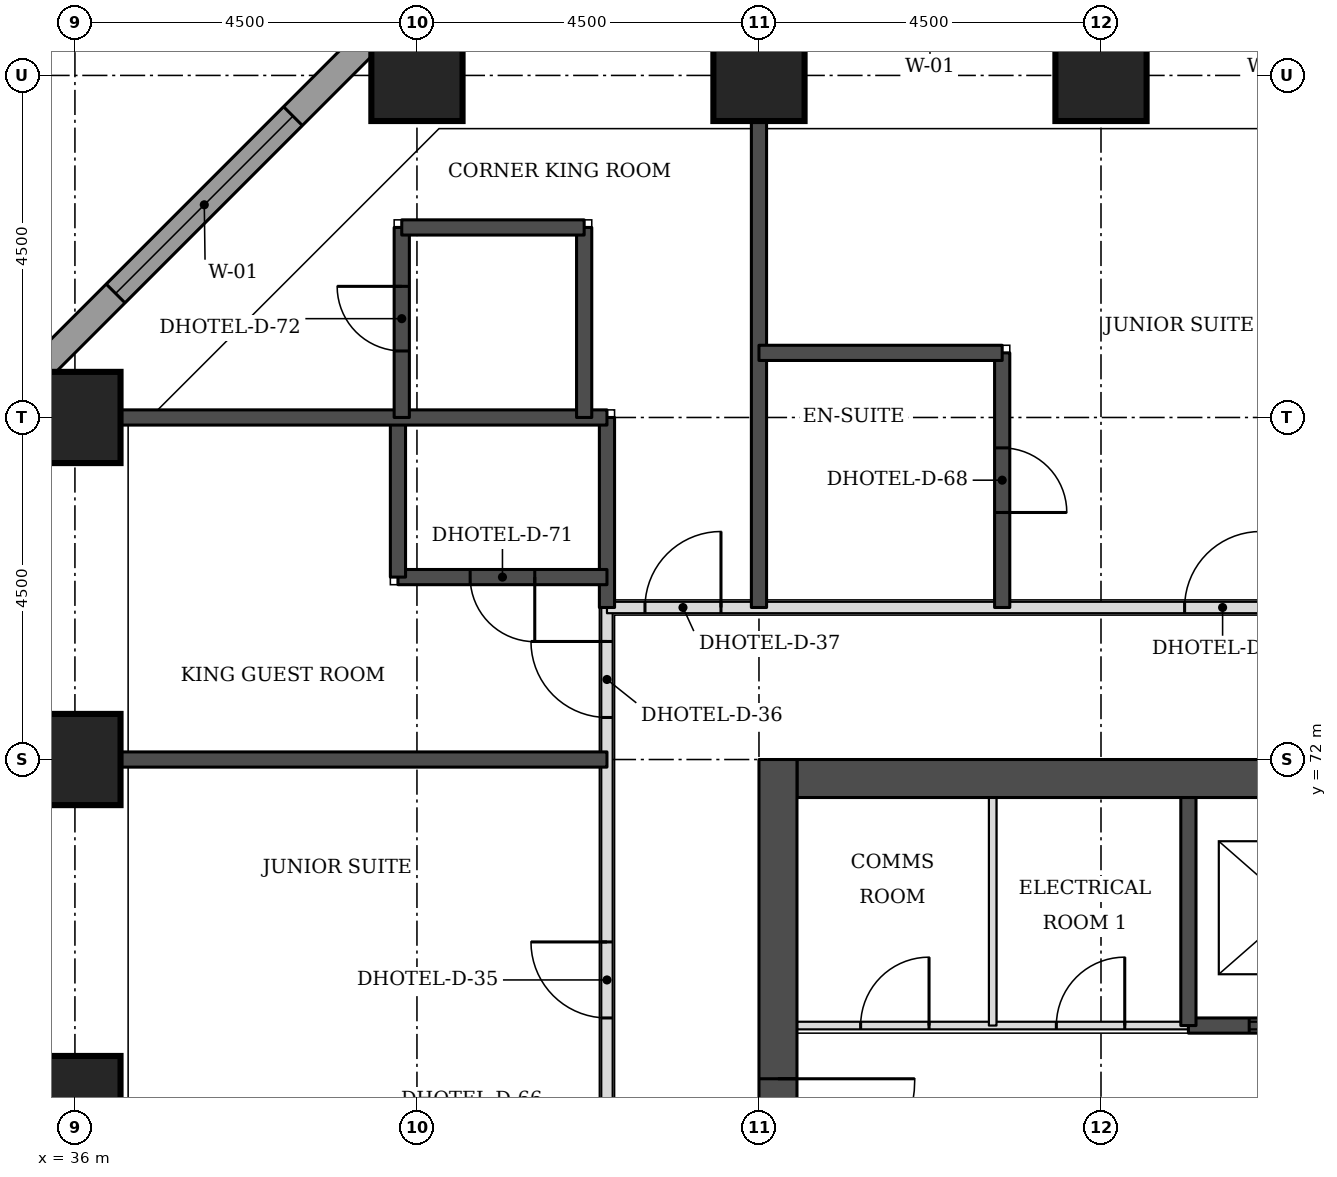
"""IFC4 building model, lengths in metres.
Left out: names, types, materials, properties, quantities, classifications, styles, units other than length and angle.
Written with IfcOpenShell. Run it as: python <this file> out.ifc"""

import sys

from ifc_helpers import new_model, si_unit, direction, frame, frame_2d, origin, origin_2d, place, context, subcontext, project, spatial, rectangle, extrude, element, fill, save


model = new_model("IFC4")
c1 = context("Model", 3, precision=1e-05, world=origin(), true_north=direction((0.0, 1.0)))
c2 = subcontext(c1, "Body", "Model", "MODEL_VIEW")
j1 = project(units=[si_unit("LENGTHUNIT", "METRE"), si_unit("PLANEANGLEUNIT", "RADIAN")], contexts=[c1])
p1 = place(None, origin())
s1 = spatial("IfcSite", under=j1, at=p1, CompositionType="ELEMENT")
p2 = place(p1, origin())
s2 = spatial("IfcBuilding", under=s1, at=p2, CompositionType="ELEMENT")
p3 = place(p2, frame((0.0, 0.0, 59.4)))
s3 = spatial("IfcBuildingStorey", under=s2, at=p3, CompositionType="ELEMENT", Elevation=59.4)
for number, where, z_axis, x_axis in (
    (1, (36.0, 67.5, 0.0), (0.0, 0.0, 1.0), (1.0, 0.0, 0.0)),
    (2, (36.0, 72.0, 0.0), (0.0, 0.0, 1.0), (1.0, 0.0, 0.0)),
    (3, (36.0, 76.5, 0.0), (0.0, 0.0, 1.0), (1.0, 0.0, 0.0)),
    (4, (40.5, 81.0, 0.0), (0.0, 0.0, 1.0), (1.0, 0.0, 0.0)),
    (5, (45.0, 81.0, 0.0), (0.0, 0.0, 1.0), (1.0, 0.0, 0.0)),
    (6, (49.5, 81.0, 0.0), (0.0, 0.0, 1.0), (1.0, 0.0, 0.0)),
):
    element("IfcColumn", number, at=place(p3, frame(where, z_axis=z_axis, x_axis=x_axis)), inside=s3, PredefinedType="COLUMN", context=c2, shape_type="SweptSolid", body=[
        extrude(rectangle(XDim=1.2, YDim=1.2, at=origin_2d()), origin(), (0.0, 0.0, 1.0), 3.3),
    ])
p4 = place(p3, frame((45.5, 71.75, 0.0), z_axis=(0.0, 0.0, 1.0), x_axis=(1.0, 0.0, 0.0)))
e7 = element("IfcWall", 7, at=p4, inside=s3, PredefinedType="SHEAR", context=c2, shape_type="SweptSolid", body=[
    extrude(rectangle(XDim=21.5, YDim=0.5, at=frame_2d((10.75, 0.0))), origin(), (0.0, 0.0, 1.0), 3.3),
])
p5 = place(p3, frame((45.25, 49.5, 0.0), z_axis=(0.0, 0.0, 1.0), x_axis=(0.0, 1.0, 0.0)))
e8 = element("IfcWall", 8, at=p5, inside=s3, PredefinedType="SHEAR", context=c2, shape_type="SweptSolid", body=[
    extrude(rectangle(XDim=22.5, YDim=0.5, at=frame_2d((11.25, 0.0))), origin(), (0.0, 0.0, 1.0), 3.3),
])
p6 = place(p5, frame((4.2, 0.0, 0.0)))
e9 = element("IfcOpeningElement", 9, at=p6, cuts=e8, PredefinedType="OPENING", context=c2, shape_type="SweptSolid", body=[
    extrude(rectangle(XDim=1.8, YDim=2.1, at=frame_2d((0.9, 1.05))), frame((0.0, 0.26, 0.0), z_axis=(0.0, -1.0, 0.0), x_axis=(1.0, 0.0, 0.0)), (0.0, 0.0, 1.0), 0.52),
])
p7 = place(p5, frame((6.9, 0.0, 0.0)))
e10 = element("IfcOpeningElement", 10, at=p7, cuts=e8, PredefinedType="OPENING", context=c2, shape_type="SweptSolid", body=[
    extrude(rectangle(XDim=1.1, YDim=2.1, at=frame_2d((0.55, 1.05))), frame((0.0, 0.26, 0.0), z_axis=(0.0, -1.0, 0.0), x_axis=(1.0, 0.0, 0.0)), (0.0, 0.0, 1.0), 0.52),
])
p8 = place(p5, frame((13.6, 0.0, 0.0)))
e11 = element("IfcOpeningElement", 11, at=p8, cuts=e8, PredefinedType="OPENING", context=c2, shape_type="SweptSolid", body=[
    extrude(rectangle(XDim=1.1, YDim=2.1, at=frame_2d((0.55, 1.05))), frame((0.0, 0.26, 0.0), z_axis=(0.0, -1.0, 0.0), x_axis=(1.0, 0.0, 0.0)), (0.0, 0.0, 1.0), 0.52),
])
p9 = place(p5, frame((16.5, 0.0, 0.0)))
e12 = element("IfcOpeningElement", 12, at=p9, cuts=e8, PredefinedType="OPENING", context=c2, shape_type="SweptSolid", body=[
    extrude(rectangle(XDim=1.8, YDim=2.1, at=frame_2d((0.9, 1.05))), frame((0.0, 0.26, 0.0), z_axis=(0.0, -1.0, 0.0), x_axis=(1.0, 0.0, 0.0)), (0.0, 0.0, 1.0), 0.52),
])
p10 = place(p3, frame((40.23, 81.826, 0.0), z_axis=(0.0, 0.0, 1.0), x_axis=(-0.707106781187, -0.707106781187, 0.0)))
e13 = element("IfcWall", 13, at=p10, inside=s3, PredefinedType="STANDARD", context=c2, shape_type="SweptSolid", body=[
    extrude(rectangle(XDim=7.151, YDim=0.35, at=frame_2d((3.576, 0.0))), origin(), (0.0, 0.0, 1.0), 3.055),
])
p11 = place(p10, frame((1.926, 0.0, 0.8)))
e14 = element("IfcOpeningElement", 14, at=p11, cuts=e13, PredefinedType="OPENING", context=c2, shape_type="SweptSolid", body=[
    extrude(rectangle(XDim=3.3, YDim=1.5, at=frame_2d((1.65, 0.75))), frame((0.0, 0.185, 0.0), z_axis=(0.0, -1.0, 0.0), x_axis=(1.0, 0.0, 0.0)), (0.0, 0.0, 1.0), 0.37),
])
p12 = place(p3, frame((43.0, 57.35, 0.0), z_axis=(0.0, 0.0, 1.0), x_axis=(0.0, 1.0, 0.0)))
e15 = element("IfcWall", 15, at=p12, inside=s3, PredefinedType="PARTITIONING", context=c2, shape_type="SweptSolid", body=[
    extrude(rectangle(XDim=16.65, YDim=0.15, at=frame_2d((8.325, 0.0))), origin(), (0.0, 0.0, 1.0), 3.08),
])
p13 = place(p12, frame((11.25, 0.0, 0.0)))
e16 = element("IfcOpeningElement", 16, at=p13, cuts=e15, PredefinedType="OPENING", context=c2, shape_type="SweptSolid", body=[
    extrude(rectangle(XDim=1.0, YDim=2.1, at=frame_2d((0.5, 1.05))), frame((0.0, 0.085, 0.0), z_axis=(0.0, -1.0, 0.0), x_axis=(1.0, 0.0, 0.0)), (0.0, 0.0, 1.0), 0.17),
])
p14 = place(p12, frame((15.203, 0.0, 0.0)))
e17 = element("IfcOpeningElement", 17, at=p14, cuts=e15, PredefinedType="OPENING", context=c2, shape_type="SweptSolid", body=[
    extrude(rectangle(XDim=1.0, YDim=2.1, at=frame_2d((0.5, 1.05))), frame((0.0, 0.085, 0.0), z_axis=(0.0, -1.0, 0.0), x_axis=(1.0, 0.0, 0.0)), (0.0, 0.0, 1.0), 0.17),
])
p15 = place(p3, frame((43.0, 74.0, 0.0), z_axis=(0.0, 0.0, 1.0), x_axis=(1.0, 0.0, 0.0)))
e18 = element("IfcWall", 18, at=p15, inside=s3, PredefinedType="PARTITIONING", context=c2, shape_type="SweptSolid", body=[
    extrude(rectangle(XDim=26.5, YDim=0.15, at=frame_2d((13.25, 0.0))), origin(), (0.0, 0.0, 1.0), 3.08),
])
p16 = place(p15, frame((7.6, 0.0, 0.0)))
e19 = element("IfcOpeningElement", 19, at=p16, cuts=e18, PredefinedType="OPENING", context=c2, shape_type="SweptSolid", body=[
    extrude(rectangle(XDim=1.0, YDim=2.1, at=frame_2d((0.5, 1.05))), frame((0.0, 0.085, 0.0), z_axis=(0.0, -1.0, 0.0), x_axis=(1.0, 0.0, 0.0)), (0.0, 0.0, 1.0), 0.17),
])
p17 = place(p15, frame((13.65, 0.0, 0.0)))
e20 = element("IfcOpeningElement", 20, at=p17, cuts=e18, PredefinedType="OPENING", context=c2, shape_type="SweptSolid", body=[
    extrude(rectangle(XDim=1.0, YDim=2.1, at=frame_2d((0.5, 1.05))), frame((0.0, 0.085, 0.0), z_axis=(0.0, -1.0, 0.0), x_axis=(1.0, 0.0, 0.0)), (0.0, 0.0, 1.0), 0.17),
])
p18 = place(p15, frame((23.05, 0.0, 0.0)))
e21 = element("IfcOpeningElement", 21, at=p18, cuts=e18, PredefinedType="OPENING", context=c2, shape_type="SweptSolid", body=[
    extrude(rectangle(XDim=1.0, YDim=2.1, at=frame_2d((0.5, 1.05))), frame((0.0, 0.085, 0.0), z_axis=(0.0, -1.0, 0.0), x_axis=(1.0, 0.0, 0.0)), (0.0, 0.0, 1.0), 0.17),
])
p19 = place(p15, frame((0.5, 0.0, 0.0)))
e22 = element("IfcOpeningElement", 22, at=p19, cuts=e18, PredefinedType="OPENING", context=c2, shape_type="SweptSolid", body=[
    extrude(rectangle(XDim=1.0, YDim=2.1, at=frame_2d((0.5, 1.05))), frame((0.0, 0.085, 0.0), z_axis=(0.0, -1.0, 0.0), x_axis=(1.0, 0.0, 0.0)), (0.0, 0.0, 1.0), 0.17),
])
p20 = place(p15, frame((25.0, 0.0, 0.0)))
e23 = element("IfcOpeningElement", 23, at=p20, cuts=e18, PredefinedType="OPENING", context=c2, shape_type="SweptSolid", body=[
    extrude(rectangle(XDim=1.0, YDim=2.1, at=frame_2d((0.5, 1.05))), frame((0.0, 0.085, 0.0), z_axis=(0.0, -1.0, 0.0), x_axis=(1.0, 0.0, 0.0)), (0.0, 0.0, 1.0), 0.17),
])
p21 = place(p3, frame((36.6, 72.0, 0.0), z_axis=(0.0, 0.0, 1.0), x_axis=(1.0, 0.0, 0.0)))
e24 = element("IfcWall", 24, at=p21, inside=s3, PredefinedType="SOLIDWALL", context=c2, shape_type="SweptSolid", body=[
    extrude(rectangle(XDim=6.4, YDim=0.2, at=frame_2d((3.2, 0.0))), origin(), (0.0, 0.0, 1.0), 3.08),
])
p22 = place(p3, frame((43.0, 74.0, 0.0), z_axis=(0.0, 0.0, 1.0), x_axis=(0.0, 1.0, 0.0)))
e25 = element("IfcWall", 25, at=p22, inside=s3, PredefinedType="SOLIDWALL", context=c2, shape_type="SweptSolid", body=[
    extrude(rectangle(XDim=2.5, YDim=0.2, at=frame_2d((1.25, 0.0))), origin(), (0.0, 0.0, 1.0), 3.08),
])
p23 = place(p3, frame((45.0, 74.0, 0.0), z_axis=(0.0, 0.0, 1.0), x_axis=(0.0, 1.0, 0.0)))
e26 = element("IfcWall", 26, at=p23, inside=s3, PredefinedType="SOLIDWALL", context=c2, shape_type="SweptSolid", body=[
    extrude(rectangle(XDim=6.4, YDim=0.2, at=frame_2d((3.2, 0.0))), origin(), (0.0, 0.0, 1.0), 3.08),
])
p24 = place(p3, frame((48.2, 74.0, 0.0), z_axis=(0.0, 0.0, 1.0), x_axis=(0.0, 1.0, 0.0)))
e27 = element("IfcWall", 27, at=p24, inside=s3, PredefinedType="SOLIDWALL", context=c2, shape_type="SweptSolid", body=[
    extrude(rectangle(XDim=3.35, YDim=0.2, at=frame_2d((1.675, 0.0))), origin(), (0.0, 0.0, 1.0), 3.08),
])
p25 = place(p24, frame((1.25, 0.0, 0.0)))
e28 = element("IfcOpeningElement", 28, at=p25, cuts=e27, PredefinedType="OPENING", context=c2, shape_type="SweptSolid", body=[
    extrude(rectangle(XDim=0.85, YDim=2.1, at=frame_2d((0.425, 1.05))), frame((0.0, 0.11, 0.0), z_axis=(0.0, -1.0, 0.0), x_axis=(1.0, 0.0, 0.0)), (0.0, 0.0, 1.0), 0.22),
])
p26 = place(p3, frame((40.25, 74.4, 0.0), z_axis=(0.0, 0.0, 1.0), x_axis=(1.0, 0.0, 0.0)))
e29 = element("IfcWall", 29, at=p26, inside=s3, PredefinedType="SOLIDWALL", context=c2, shape_type="SweptSolid", body=[
    extrude(rectangle(XDim=2.75, YDim=0.2, at=frame_2d((1.375, 0.0))), origin(), (0.0, 0.0, 1.0), 3.08),
])
p27 = place(p26, frame((0.95, 0.0, 0.0)))
e30 = element("IfcOpeningElement", 30, at=p27, cuts=e29, PredefinedType="OPENING", context=c2, shape_type="SweptSolid", body=[
    extrude(rectangle(XDim=0.85, YDim=2.1, at=frame_2d((0.425, 1.05))), frame((0.0, 0.11, 0.0), z_axis=(0.0, -1.0, 0.0), x_axis=(1.0, 0.0, 0.0)), (0.0, 0.0, 1.0), 0.22),
])
p28 = place(p3, frame((40.25, 74.4, 0.0), z_axis=(0.0, 0.0, 1.0), x_axis=(0.0, 1.0, 0.0)))
e31 = element("IfcWall", 31, at=p28, inside=s3, PredefinedType="SOLIDWALL", context=c2, shape_type="SweptSolid", body=[
    extrude(rectangle(XDim=2.1, YDim=0.2, at=frame_2d((1.05, 0.0))), origin(), (0.0, 0.0, 1.0), 3.08),
])
p29 = place(p3, frame((36.6, 76.5, 0.0), z_axis=(0.0, 0.0, 1.0), x_axis=(1.0, 0.0, 0.0)))
e32 = element("IfcWall", 32, at=p29, inside=s3, PredefinedType="SOLIDWALL", context=c2, shape_type="SweptSolid", body=[
    extrude(rectangle(XDim=6.4, YDim=0.2, at=frame_2d((3.2, 0.0))), origin(), (0.0, 0.0, 1.0), 3.08),
])
p30 = place(p3, frame((40.3, 76.5, 0.0), z_axis=(0.0, 0.0, 1.0), x_axis=(0.0, 1.0, 0.0)))
e33 = element("IfcWall", 33, at=p30, inside=s3, PredefinedType="SOLIDWALL", context=c2, shape_type="SweptSolid", body=[
    extrude(rectangle(XDim=2.5, YDim=0.2, at=frame_2d((1.25, 0.0))), origin(), (0.0, 0.0, 1.0), 3.08),
])
p31 = place(p30, frame((0.875, 0.0, 0.0)))
e34 = element("IfcOpeningElement", 34, at=p31, cuts=e33, PredefinedType="OPENING", context=c2, shape_type="SweptSolid", body=[
    extrude(rectangle(XDim=0.85, YDim=2.1, at=frame_2d((0.425, 1.05))), frame((0.0, 0.11, 0.0), z_axis=(0.0, -1.0, 0.0), x_axis=(1.0, 0.0, 0.0)), (0.0, 0.0, 1.0), 0.22),
])
p32 = place(p3, frame((42.7, 76.5, 0.0), z_axis=(0.0, 0.0, 1.0), x_axis=(0.0, 1.0, 0.0)))
e35 = element("IfcWall", 35, at=p32, inside=s3, PredefinedType="SOLIDWALL", context=c2, shape_type="SweptSolid", body=[
    extrude(rectangle(XDim=2.5, YDim=0.2, at=frame_2d((1.25, 0.0))), origin(), (0.0, 0.0, 1.0), 3.08),
])
p33 = place(p3, frame((45.0, 77.35, 0.0), z_axis=(0.0, 0.0, 1.0), x_axis=(1.0, 0.0, 0.0)))
e36 = element("IfcWall", 36, at=p33, inside=s3, PredefinedType="SOLIDWALL", context=c2, shape_type="SweptSolid", body=[
    extrude(rectangle(XDim=3.2, YDim=0.2, at=frame_2d((1.6, 0.0))), origin(), (0.0, 0.0, 1.0), 3.08),
])
p34 = place(p3, frame((40.3, 79.0, 0.0), z_axis=(0.0, 0.0, 1.0), x_axis=(1.0, 0.0, 0.0)))
e37 = element("IfcWall", 37, at=p34, inside=s3, PredefinedType="SOLIDWALL", context=c2, shape_type="SweptSolid", body=[
    extrude(rectangle(XDim=2.4, YDim=0.2, at=frame_2d((1.2, 0.0))), origin(), (0.0, 0.0, 1.0), 3.08),
])
p35 = place(p3, frame((45.5, 68.5, 0.0), z_axis=(0.0, 0.0, 1.0), x_axis=(1.0, 0.0, 0.0)))
e38 = element("IfcWall", 38, at=p35, inside=s3, PredefinedType="PARTITIONING", context=c2, shape_type="SweptSolid", body=[
    extrude(rectangle(XDim=5.15, YDim=0.1, at=frame_2d((2.575, 0.0))), origin(), (0.0, 0.0, 1.0), 3.08),
])
p36 = place(p35, frame((0.837, 0.0, 0.0)))
e39 = element("IfcOpeningElement", 39, at=p36, cuts=e38, PredefinedType="OPENING", context=c2, shape_type="SweptSolid", body=[
    extrude(rectangle(XDim=0.9, YDim=2.1, at=frame_2d((0.45, 1.05))), frame((0.0, 0.06, 0.0), z_axis=(0.0, -1.0, 0.0), x_axis=(1.0, 0.0, 0.0)), (0.0, 0.0, 1.0), 0.12),
])
p37 = place(p35, frame((3.413, 0.0, 0.0)))
e40 = element("IfcOpeningElement", 40, at=p37, cuts=e38, PredefinedType="OPENING", context=c2, shape_type="SweptSolid", body=[
    extrude(rectangle(XDim=0.9, YDim=2.1, at=frame_2d((0.45, 1.05))), frame((0.0, 0.06, 0.0), z_axis=(0.0, -1.0, 0.0), x_axis=(1.0, 0.0, 0.0)), (0.0, 0.0, 1.0), 0.12),
])
p38 = place(p3, frame((50.65, 68.5, 0.0), z_axis=(0.0, 0.0, 1.0), x_axis=(1.0, 0.0, 0.0)))
e41 = element("IfcWall", 41, at=p38, inside=s3, PredefinedType="SOLIDWALL", context=c2, shape_type="SweptSolid", body=[
    extrude(rectangle(XDim=11.2, YDim=0.2, at=frame_2d((5.6, 0.0))), origin(), (0.0, 0.0, 1.0), 3.08),
])
p39 = place(p38, frame((0.8, 0.0, 0.0)))
e42 = element("IfcOpeningElement", 42, at=p39, cuts=e41, PredefinedType="OPENING", context=c2, shape_type="SweptSolid", body=[
    extrude(rectangle(XDim=1.2, YDim=2.1, at=frame_2d((0.6, 1.05))), frame((0.0, 0.11, 0.0), z_axis=(0.0, -1.0, 0.0), x_axis=(1.0, 0.0, 0.0)), (0.0, 0.0, 1.0), 0.22),
])
p40 = place(p38, frame((3.6, 0.0, 0.0)))
e43 = element("IfcOpeningElement", 43, at=p40, cuts=e41, PredefinedType="OPENING", context=c2, shape_type="SweptSolid", body=[
    extrude(rectangle(XDim=1.2, YDim=2.1, at=frame_2d((0.6, 1.05))), frame((0.0, 0.11, 0.0), z_axis=(0.0, -1.0, 0.0), x_axis=(1.0, 0.0, 0.0)), (0.0, 0.0, 1.0), 0.22),
])
p41 = place(p38, frame((6.4, 0.0, 0.0)))
e44 = element("IfcOpeningElement", 44, at=p41, cuts=e41, PredefinedType="OPENING", context=c2, shape_type="SweptSolid", body=[
    extrude(rectangle(XDim=1.2, YDim=2.1, at=frame_2d((0.6, 1.05))), frame((0.0, 0.11, 0.0), z_axis=(0.0, -1.0, 0.0), x_axis=(1.0, 0.0, 0.0)), (0.0, 0.0, 1.0), 0.22),
])
p42 = place(p38, frame((9.2, 0.0, 0.0)))
e45 = element("IfcOpeningElement", 45, at=p42, cuts=e41, PredefinedType="OPENING", context=c2, shape_type="SweptSolid", body=[
    extrude(rectangle(XDim=1.2, YDim=2.1, at=frame_2d((0.6, 1.05))), frame((0.0, 0.11, 0.0), z_axis=(0.0, -1.0, 0.0), x_axis=(1.0, 0.0, 0.0)), (0.0, 0.0, 1.0), 0.22),
])
p43 = place(p3, frame((48.075, 68.5, 0.0), z_axis=(0.0, 0.0, 1.0), x_axis=(0.0, 1.0, 0.0)))
e46 = element("IfcWall", 46, at=p43, inside=s3, PredefinedType="PARTITIONING", context=c2, shape_type="SweptSolid", body=[
    extrude(rectangle(XDim=3.0, YDim=0.1, at=frame_2d((1.5, 0.0))), origin(), (0.0, 0.0, 1.0), 3.08),
])
p44 = place(p3, frame((50.65, 68.5, 0.0), z_axis=(0.0, 0.0, 1.0), x_axis=(0.0, 1.0, 0.0)))
e47 = element("IfcWall", 47, at=p44, inside=s3, PredefinedType="SOLIDWALL", context=c2, shape_type="SweptSolid", body=[
    extrude(rectangle(XDim=3.0, YDim=0.2, at=frame_2d((1.5, 0.0))), origin(), (0.0, 0.0, 1.0), 3.08),
])
p45 = place(p11, origin())
e48 = element("IfcWindow", 48, at=p45, inside=s3, PartitioningType="SINGLE_PANEL", PredefinedType="WINDOW", context=c2, shape_type="SweptSolid", body=[
    extrude(rectangle(XDim=3.3, YDim=1.5, at=frame_2d((1.65, 0.75))), frame((0.0, 0.085, 0.0), z_axis=(0.0, -1.0, 0.0), x_axis=(1.0, 0.0, 0.0)), (0.0, 0.0, 1.0), 0.06),
])
fill(e14, e48)
p46 = place(p13, origin())
e49 = element("IfcDoor", 49, at=p46, inside=s3, OperationType="SINGLE_SWING_RIGHT", PredefinedType="DOOR", context=c2, shape_type="SweptSolid", body=[
    extrude(rectangle(XDim=1.0, YDim=2.1, at=frame_2d((0.5, 1.05))), frame((0.0, 0.025, 0.0), z_axis=(0.0, -1.0, 0.0), x_axis=(1.0, 0.0, 0.0)), (0.0, 0.0, 1.0), 0.05),
])
fill(e16, e49)
p47 = place(p14, origin())
e50 = element("IfcDoor", 50, at=p47, inside=s3, OperationType="SINGLE_SWING_RIGHT", PredefinedType="DOOR", context=c2, shape_type="SweptSolid", body=[
    extrude(rectangle(XDim=1.0, YDim=2.1, at=frame_2d((0.5, 1.05))), frame((0.0, 0.025, 0.0), z_axis=(0.0, -1.0, 0.0), x_axis=(1.0, 0.0, 0.0)), (0.0, 0.0, 1.0), 0.05),
])
fill(e17, e50)
p48 = place(p27, frame((0.85, 0.0, 0.0), z_axis=(0.0, 0.0, 1.0), x_axis=(-1.0, 0.0, 0.0)))
e51 = element("IfcDoor", 51, at=p48, inside=s3, OperationType="SINGLE_SWING_LEFT", PredefinedType="DOOR", context=c2, shape_type="SweptSolid", body=[
    extrude(rectangle(XDim=0.85, YDim=2.1, at=frame_2d((0.425, 1.05))), frame((0.0, 0.025, 0.0), z_axis=(0.0, -1.0, 0.0), x_axis=(1.0, 0.0, 0.0)), (0.0, 0.0, 1.0), 0.05),
])
fill(e30, e51)
p49 = place(p16, origin())
e52 = element("IfcDoor", 52, at=p49, inside=s3, OperationType="SINGLE_SWING_RIGHT", PredefinedType="DOOR", context=c2, shape_type="SweptSolid", body=[
    extrude(rectangle(XDim=1.0, YDim=2.1, at=frame_2d((0.5, 1.05))), frame((0.0, 0.025, 0.0), z_axis=(0.0, -1.0, 0.0), x_axis=(1.0, 0.0, 0.0)), (0.0, 0.0, 1.0), 0.05),
])
fill(e19, e52)
p50 = place(p25, frame((0.85, 0.0, 0.0), z_axis=(0.0, 0.0, 1.0), x_axis=(-1.0, 0.0, 0.0)))
e53 = element("IfcDoor", 53, at=p50, inside=s3, OperationType="SINGLE_SWING_RIGHT", PredefinedType="DOOR", context=c2, shape_type="SweptSolid", body=[
    extrude(rectangle(XDim=0.85, YDim=2.1, at=frame_2d((0.425, 1.05))), frame((0.0, 0.025, 0.0), z_axis=(0.0, -1.0, 0.0), x_axis=(1.0, 0.0, 0.0)), (0.0, 0.0, 1.0), 0.05),
])
fill(e28, e53)
p51 = place(p19, origin())
e54 = element("IfcDoor", 54, at=p51, inside=s3, OperationType="SINGLE_SWING_RIGHT", PredefinedType="DOOR", context=c2, shape_type="SweptSolid", body=[
    extrude(rectangle(XDim=1.0, YDim=2.1, at=frame_2d((0.5, 1.05))), frame((0.0, 0.025, 0.0), z_axis=(0.0, -1.0, 0.0), x_axis=(1.0, 0.0, 0.0)), (0.0, 0.0, 1.0), 0.05),
])
fill(e22, e54)
p52 = place(p31, origin())
e55 = element("IfcDoor", 55, at=p52, inside=s3, OperationType="SINGLE_SWING_RIGHT", PredefinedType="DOOR", context=c2, shape_type="SweptSolid", body=[
    extrude(rectangle(XDim=0.85, YDim=2.1, at=frame_2d((0.425, 1.05))), frame((0.0, 0.025, 0.0), z_axis=(0.0, -1.0, 0.0), x_axis=(1.0, 0.0, 0.0)), (0.0, 0.0, 1.0), 0.05),
])
fill(e34, e55)
p53 = place(p39, origin())
e56 = element("IfcDoor", 56, at=p53, inside=s3, OperationType="DOUBLE_DOOR_SLIDING", PredefinedType="DOOR", context=c2, shape_type="SweptSolid", body=[
    extrude(rectangle(XDim=1.2, YDim=2.1, at=frame_2d((0.6, 1.05))), frame((0.0, 0.025, 0.0), z_axis=(0.0, -1.0, 0.0), x_axis=(1.0, 0.0, 0.0)), (0.0, 0.0, 1.0), 0.05),
])
fill(e42, e56)
p54 = place(p9, frame((1.8, 0.0, 0.0), z_axis=(0.0, 0.0, 1.0), x_axis=(-1.0, 0.0, 0.0)))
e57 = element("IfcDoor", 57, at=p54, inside=s3, OperationType="SINGLE_SWING_LEFT", PredefinedType="DOOR", context=c2, shape_type="SweptSolid", body=[
    extrude(rectangle(XDim=1.8, YDim=2.1, at=frame_2d((0.9, 1.05))), frame((0.0, 0.025, 0.0), z_axis=(0.0, -1.0, 0.0), x_axis=(1.0, 0.0, 0.0)), (0.0, 0.0, 1.0), 0.05),
])
fill(e12, e57)
p55 = place(p36, origin())
e58 = element("IfcDoor", 58, at=p55, inside=s3, OperationType="SINGLE_SWING_RIGHT", PredefinedType="DOOR", context=c2, shape_type="SweptSolid", body=[
    extrude(rectangle(XDim=0.9, YDim=2.1, at=frame_2d((0.45, 1.05))), frame((0.0, 0.025, 0.0), z_axis=(0.0, -1.0, 0.0), x_axis=(1.0, 0.0, 0.0)), (0.0, 0.0, 1.0), 0.05),
])
fill(e39, e58)
p56 = place(p37, origin())
e59 = element("IfcDoor", 59, at=p56, inside=s3, OperationType="SINGLE_SWING_RIGHT", PredefinedType="DOOR", context=c2, shape_type="SweptSolid", body=[
    extrude(rectangle(XDim=0.9, YDim=2.1, at=frame_2d((0.45, 1.05))), frame((0.0, 0.025, 0.0), z_axis=(0.0, -1.0, 0.0), x_axis=(1.0, 0.0, 0.0)), (0.0, 0.0, 1.0), 0.05),
])
fill(e40, e59)
save(model, sys.argv[1])
